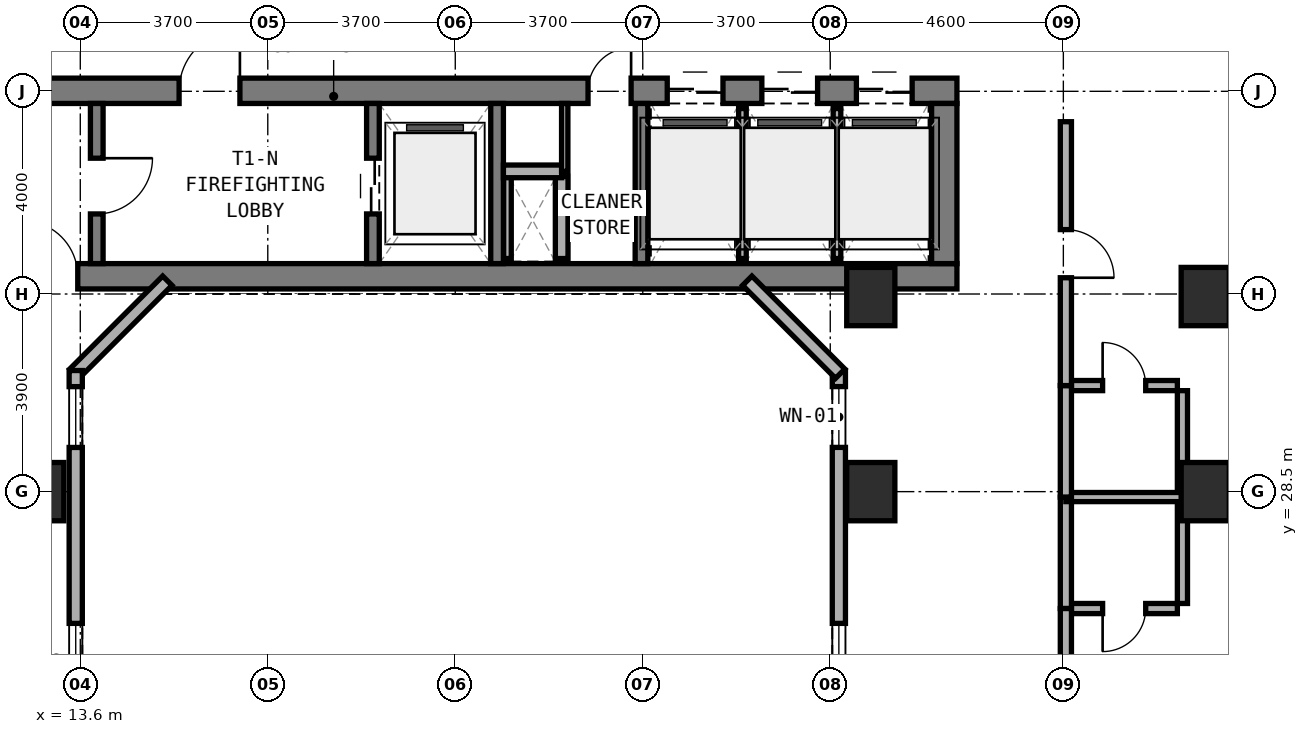
"""IFC4 building model, lengths in metres.
Left out: names, types, materials, properties, quantities, classifications, styles, units other than length and angle.
Written with IfcOpenShell. Run it as: python <this file> out.ifc"""

import sys

from ifc_helpers import new_model, si_unit, direction, frame, frame_2d, origin, origin_2d, place, context, subcontext, project, spatial, rectangle, extrude, element, fill, save


model = new_model("IFC4")
c1 = context("Model", 3, precision=1e-05, world=origin(), true_north=direction((0.0, 1.0)))
c2 = subcontext(c1, "Body", "Model", "MODEL_VIEW")
j1 = project(units=[si_unit("LENGTHUNIT", "METRE"), si_unit("PLANEANGLEUNIT", "RADIAN")], contexts=[c1])
p1 = place(None, origin())
s1 = spatial("IfcSite", under=j1, at=p1, CompositionType="ELEMENT")
p2 = place(p1, origin())
s2 = spatial("IfcBuilding", under=s1, at=p2, CompositionType="ELEMENT")
p3 = place(p2, frame((0.0, 0.0, 69.5)))
s3 = spatial("IfcBuildingStorey", under=s2, at=p3, CompositionType="ELEMENT", Elevation=69.5)
p4 = place(p3, frame((6.3, 32.75, 0.0), z_axis=(0.0, 0.0, 1.0), x_axis=(1.0, 0.0, 0.0)))
e1 = element("IfcWall", 1, at=p4, inside=s3, PredefinedType="SHEAR", context=c2, shape_type="SweptSolid", body=[
    extrude(rectangle(XDim=24.6, YDim=0.5, at=frame_2d((12.3, 0.0))), origin(), (0.0, 0.0, 1.0), 3.5),
])
p5 = place(p4, frame((6.15, 0.0, 0.0)))
e2 = element("IfcOpeningElement", 2, at=p5, cuts=e1, PredefinedType="OPENING", context=c2, shape_type="SweptSolid", body=[
    extrude(rectangle(XDim=1.1, YDim=2.15, at=frame_2d((0.55, 1.075))), frame((0.0, 0.26, 0.0), z_axis=(0.0, -1.0, 0.0), x_axis=(1.0, 0.0, 0.0)), (0.0, 0.0, 1.0), 0.52),
])
p6 = place(p3, frame((6.3, 36.41, 0.0), z_axis=(0.0, 0.0, 1.0), x_axis=(1.0, 0.0, 0.0)))
e3 = element("IfcWall", 3, at=p6, inside=s3, PredefinedType="SHEAR", context=c2, shape_type="SweptSolid", body=[
    extrude(rectangle(XDim=24.6, YDim=0.5, at=frame_2d((12.3, 0.0))), origin(), (0.0, 0.0, 1.0), 3.5),
])
p7 = place(p6, frame((9.25, 0.0, 0.0)))
e4 = element("IfcOpeningElement", 4, at=p7, cuts=e3, PredefinedType="OPENING", context=c2, shape_type="SweptSolid", body=[
    extrude(rectangle(XDim=1.2, YDim=2.15, at=frame_2d((0.6, 1.075))), frame((0.0, 0.26, 0.0), z_axis=(0.0, -1.0, 0.0), x_axis=(1.0, 0.0, 0.0)), (0.0, 0.0, 1.0), 0.52),
])
p8 = place(p6, frame((17.32, 0.0, 0.0)))
e5 = element("IfcOpeningElement", 5, at=p8, cuts=e3, PredefinedType="OPENING", context=c2, shape_type="SweptSolid", body=[
    extrude(rectangle(XDim=0.85, YDim=2.1, at=frame_2d((0.425, 1.05))), frame((0.0, 0.26, 0.0), z_axis=(0.0, -1.0, 0.0), x_axis=(1.0, 0.0, 0.0)), (0.0, 0.0, 1.0), 0.52),
])
p9 = place(p6, frame((18.883, 0.0, 0.0)))
e6 = element("IfcOpeningElement", 6, at=p9, cuts=e3, PredefinedType="OPENING", context=c2, shape_type="SweptSolid", body=[
    extrude(rectangle(XDim=1.1, YDim=2.15, at=frame_2d((0.55, 1.075))), frame((0.0, 0.26, 0.0), z_axis=(0.0, -1.0, 0.0), x_axis=(1.0, 0.0, 0.0)), (0.0, 0.0, 1.0), 0.52),
])
p10 = place(p6, frame((20.75, 0.0, 0.0)))
e7 = element("IfcOpeningElement", 7, at=p10, cuts=e3, PredefinedType="OPENING", context=c2, shape_type="SweptSolid", body=[
    extrude(rectangle(XDim=1.1, YDim=2.15, at=frame_2d((0.55, 1.075))), frame((0.0, 0.26, 0.0), z_axis=(0.0, -1.0, 0.0), x_axis=(1.0, 0.0, 0.0)), (0.0, 0.0, 1.0), 0.52),
])
p11 = place(p6, frame((22.616, 0.0, 0.0)))
e8 = element("IfcOpeningElement", 8, at=p11, cuts=e3, PredefinedType="OPENING", context=c2, shape_type="SweptSolid", body=[
    extrude(rectangle(XDim=1.1, YDim=2.15, at=frame_2d((0.55, 1.075))), frame((0.0, 0.26, 0.0), z_axis=(0.0, -1.0, 0.0), x_axis=(1.0, 0.0, 0.0)), (0.0, 0.0, 1.0), 0.52),
])
p12 = place(p3, frame((30.65, 33.0, 0.0), z_axis=(0.0, 0.0, 1.0), x_axis=(0.0, 1.0, 0.0)))
e9 = element("IfcWall", 9, at=p12, inside=s3, PredefinedType="SHEAR", context=c2, shape_type="SweptSolid", body=[
    extrude(rectangle(XDim=3.16, YDim=0.5, at=frame_2d((1.58, 0.0))), origin(), (0.0, 0.0, 1.0), 3.5),
])
p13 = place(p3, frame((13.925, 33.0, 0.0), z_axis=(0.0, 0.0, 1.0), x_axis=(0.0, 1.0, 0.0)))
e10 = element("IfcWall", 10, at=p13, inside=s3, PredefinedType="STANDARD", context=c2, shape_type="SweptSolid", body=[
    extrude(rectangle(XDim=3.16, YDim=0.25, at=frame_2d((1.58, 0.0))), origin(), (0.0, 0.0, 1.0), 3.22),
])
p14 = place(p13, frame((0.98, 0.0, 0.0)))
e11 = element("IfcOpeningElement", 11, at=p14, cuts=e10, PredefinedType="OPENING", context=c2, shape_type="SweptSolid", body=[
    extrude(rectangle(XDim=1.1, YDim=2.15, at=frame_2d((0.55, 1.075))), frame((0.0, 0.135, 0.0), z_axis=(0.0, -1.0, 0.0), x_axis=(1.0, 0.0, 0.0)), (0.0, 0.0, 1.0), 0.27),
])
p15 = place(p3, frame((19.375, 33.0, 0.0), z_axis=(0.0, 0.0, 1.0), x_axis=(0.0, 1.0, 0.0)))
e12 = element("IfcWall", 12, at=p15, inside=s3, PredefinedType="STANDARD", context=c2, shape_type="SweptSolid", body=[
    extrude(rectangle(XDim=3.16, YDim=0.25, at=frame_2d((1.58, 0.0))), origin(), (0.0, 0.0, 1.0), 3.22),
])
p16 = place(p15, frame((0.98, 0.0, 0.0)))
e13 = element("IfcOpeningElement", 13, at=p16, cuts=e12, PredefinedType="OPENING", context=c2, shape_type="SweptSolid", body=[
    extrude(rectangle(XDim=1.1, YDim=2.15, at=frame_2d((0.55, 1.075))), frame((0.0, 0.135, 0.0), z_axis=(0.0, -1.0, 0.0), x_axis=(1.0, 0.0, 0.0)), (0.0, 0.0, 1.0), 0.27),
])
for number, where, z_axis, x_axis in (
    (14, (21.825, 33.0, 0.0), (0.0, 0.0, 1.0), (0.0, 1.0, 0.0)),
    (15, (24.675, 33.0, 0.0), (0.0, 0.0, 1.0), (0.0, 1.0, 0.0)),
):
    element("IfcWall", number, at=place(p3, frame(where, z_axis=z_axis, x_axis=x_axis)), inside=s3, PredefinedType="STANDARD", context=c2, shape_type="SweptSolid", body=[
        extrude(rectangle(XDim=3.16, YDim=0.25, at=frame_2d((1.58, 0.0))), origin(), (0.0, 0.0, 1.0), 3.22),
    ])
for number, where, z_axis, x_axis in (
    (16, (35.8, 28.5, 0.0), (0.0, 0.0, 1.0), (1.0, 0.0, 0.0)),
    (17, (35.8, 32.35, 0.0), (0.0, 0.0, 1.0), (1.0, 0.0, 0.0)),
    (18, (12.8, 28.5, 0.0), (0.0, 0.0, 1.0), (1.0, 0.0, 0.0)),
    (19, (29.2, 32.35, 0.0), (0.0, 0.0, 1.0), (1.0, 0.0, 0.0)),
    (20, (29.2, 28.5, 0.0), (0.0, 0.0, 1.0), (1.0, 0.0, 0.0)),
):
    element("IfcColumn", number, at=place(p3, frame(where, z_axis=z_axis, x_axis=x_axis)), inside=s3, PredefinedType="COLUMN", context=c2, shape_type="SweptSolid", body=[
        extrude(rectangle(XDim=0.95, YDim=1.15, at=origin_2d()), origin(), (0.0, 0.0, 1.0), 3.5),
    ])
p17 = place(p3, frame((28.57, 19.11, 0.0), z_axis=(0.0, 0.0, 1.0), x_axis=(0.0, 1.0, 0.0)))
e21 = element("IfcWall", 21, at=p17, inside=s3, PredefinedType="STANDARD", context=c2, shape_type="SweptSolid", body=[
    extrude(rectangle(XDim=11.78, YDim=0.26, at=frame_2d((5.89, 0.0))), origin(), (0.0, 0.0, 1.0), 3.22),
])
p18 = place(p17, frame((0.318, 0.0, 0.85)))
e22 = element("IfcOpeningElement", 22, at=p18, cuts=e21, PredefinedType="OPENING", context=c2, shape_type="SweptSolid", body=[
    extrude(rectangle(XDim=1.2, YDim=1.5, at=frame_2d((0.6, 0.75))), frame((0.0, 0.14, 0.0), z_axis=(0.0, -1.0, 0.0), x_axis=(1.0, 0.0, 0.0)), (0.0, 0.0, 1.0), 0.28),
])
p19 = place(p17, frame((4.99, 0.0, 0.85)))
e23 = element("IfcOpeningElement", 23, at=p19, cuts=e21, PredefinedType="OPENING", context=c2, shape_type="SweptSolid", body=[
    extrude(rectangle(XDim=1.8, YDim=1.5, at=frame_2d((0.9, 0.75))), frame((0.0, 0.14, 0.0), z_axis=(0.0, -1.0, 0.0), x_axis=(1.0, 0.0, 0.0)), (0.0, 0.0, 1.0), 0.28),
])
p20 = place(p17, frame((10.263, 0.0, 0.85)))
e24 = element("IfcOpeningElement", 24, at=p20, cuts=e21, PredefinedType="OPENING", context=c2, shape_type="SweptSolid", body=[
    extrude(rectangle(XDim=1.2, YDim=1.5, at=frame_2d((0.6, 0.75))), frame((0.0, 0.14, 0.0), z_axis=(0.0, -1.0, 0.0), x_axis=(1.0, 0.0, 0.0)), (0.0, 0.0, 1.0), 0.28),
])
p21 = place(p3, frame((28.596, 30.828, 0.0), z_axis=(0.0, 0.0, 1.0), x_axis=(-0.707059717605, 0.707153841636, 0.0)))
e25 = element("IfcWall", 25, at=p21, inside=s3, PredefinedType="STANDARD", context=c2, shape_type="SweptSolid", body=[
    extrude(rectangle(XDim=2.594, YDim=0.26, at=frame_2d((1.297, 0.0))), origin(), (0.0, 0.0, 1.0), 3.22),
])
p22 = place(p3, frame((15.318, 32.662, 0.0), z_axis=(0.0, 0.0, 1.0), x_axis=(-0.707106781187, -0.707106781187, 0.0)))
e26 = element("IfcWall", 26, at=p22, inside=s3, PredefinedType="STANDARD", context=c2, shape_type="SweptSolid", body=[
    extrude(rectangle(XDim=2.594, YDim=0.26, at=frame_2d((1.297, 0.0))), origin(), (0.0, 0.0, 1.0), 3.22),
])
p23 = place(p3, frame((13.51, 30.89, 0.0), z_axis=(0.0, 0.0, 1.0), x_axis=(0.0, -1.0, 0.0)))
e27 = element("IfcWall", 27, at=p23, inside=s3, PredefinedType="STANDARD", context=c2, shape_type="SweptSolid", body=[
    extrude(rectangle(XDim=11.78, YDim=0.26, at=frame_2d((5.89, 0.0))), origin(), (0.0, 0.0, 1.0), 3.22),
])
p24 = place(p23, frame((0.318, 0.0, 0.85)))
e28 = element("IfcOpeningElement", 28, at=p24, cuts=e27, PredefinedType="OPENING", context=c2, shape_type="SweptSolid", body=[
    extrude(rectangle(XDim=1.2, YDim=1.5, at=frame_2d((0.6, 0.75))), frame((0.0, 0.14, 0.0), z_axis=(0.0, -1.0, 0.0), x_axis=(1.0, 0.0, 0.0)), (0.0, 0.0, 1.0), 0.28),
])
p25 = place(p23, frame((4.99, 0.0, 0.85)))
e29 = element("IfcOpeningElement", 29, at=p25, cuts=e27, PredefinedType="OPENING", context=c2, shape_type="SweptSolid", body=[
    extrude(rectangle(XDim=1.8, YDim=1.5, at=frame_2d((0.9, 0.75))), frame((0.0, 0.14, 0.0), z_axis=(0.0, -1.0, 0.0), x_axis=(1.0, 0.0, 0.0)), (0.0, 0.0, 1.0), 0.28),
])
p26 = place(p23, frame((10.263, 0.0, 0.85)))
e30 = element("IfcOpeningElement", 30, at=p26, cuts=e27, PredefinedType="OPENING", context=c2, shape_type="SweptSolid", body=[
    extrude(rectangle(XDim=1.2, YDim=1.5, at=frame_2d((0.6, 0.75))), frame((0.0, 0.14, 0.0), z_axis=(0.0, -1.0, 0.0), x_axis=(1.0, 0.0, 0.0)), (0.0, 0.0, 1.0), 0.28),
])
p27 = place(p3, frame((22.03, 33.1, 0.0), z_axis=(0.0, 0.0, 1.0), x_axis=(0.0, 1.0, 0.0)))
e31 = element("IfcWall", 31, at=p27, inside=s3, PredefinedType="PARTITIONING", context=c2, shape_type="SweptSolid", body=[
    extrude(rectangle(XDim=1.62, YDim=0.15, at=frame_2d((0.81, 0.0))), origin(), (0.0, 0.0, 1.0), 3.22),
])
p28 = place(p3, frame((23.1, 33.1, 0.0), z_axis=(0.0, 0.0, 1.0), x_axis=(0.0, 1.0, 0.0)))
e32 = element("IfcWall", 32, at=p28, inside=s3, PredefinedType="SOLIDWALL", context=c2, shape_type="SweptSolid", body=[
    extrude(rectangle(XDim=1.62, YDim=0.25, at=frame_2d((0.81, 0.0))), origin(), (0.0, 0.0, 1.0), 3.22),
])
p29 = place(p3, frame((21.95, 34.82, 0.0), z_axis=(0.0, 0.0, 1.0), x_axis=(1.0, 0.0, 0.0)))
e33 = element("IfcWall", 33, at=p29, inside=s3, PredefinedType="SOLIDWALL", context=c2, shape_type="SweptSolid", body=[
    extrude(rectangle(XDim=1.15, YDim=0.25, at=frame_2d((0.575, 0.0))), origin(), (0.0, 0.0, 1.0), 3.22),
])
p30 = place(p3, frame((23.16, 34.82, 0.0), z_axis=(0.0, 0.0, 1.0), x_axis=(0.0, 1.0, 0.0)))
e34 = element("IfcWall", 34, at=p30, inside=s3, PredefinedType="PARTITIONING", context=c2, shape_type="SweptSolid", body=[
    extrude(rectangle(XDim=1.34, YDim=0.125, at=frame_2d((0.67, 0.0))), origin(), (0.0, 0.0, 1.0), 3.22),
])
p31 = place(p3, frame((26.667, 33.1, 0.0), z_axis=(0.0, 0.0, 1.0), x_axis=(0.0, 1.0, 0.0)))
e35 = element("IfcWall", 35, at=p31, inside=s3, PredefinedType="PARTITIONING", context=c2, shape_type="SweptSolid", body=[
    extrude(rectangle(XDim=2.96, YDim=0.15, at=frame_2d((1.48, 0.0))), origin(), (0.0, 0.0, 1.0), 3.22),
])
p32 = place(p3, frame((28.533, 33.1, 0.0), z_axis=(0.0, 0.0, 1.0), x_axis=(0.0, 1.0, 0.0)))
e36 = element("IfcWall", 36, at=p32, inside=s3, PredefinedType="PARTITIONING", context=c2, shape_type="SweptSolid", body=[
    extrude(rectangle(XDim=2.96, YDim=0.15, at=frame_2d((1.48, 0.0))), origin(), (0.0, 0.0, 1.0), 2.495),
])
p33 = place(p3, frame((33.15, 26.193, 0.0), z_axis=(0.0, 0.0, 1.0), x_axis=(1.0, 0.0, 0.0)))
e37 = element("IfcWall", 37, at=p33, inside=s3, PredefinedType="PLUMBINGWALL", context=c2, shape_type="SweptSolid", body=[
    extrude(rectangle(XDim=2.1, YDim=0.2, at=frame_2d((1.05, 0.0))), origin(), (0.0, 0.0, 1.0), 3.22),
])
p34 = place(p33, frame((0.625, 0.0, 0.0)))
e38 = element("IfcOpeningElement", 38, at=p34, cuts=e37, PredefinedType="OPENING", context=c2, shape_type="SweptSolid", body=[
    extrude(rectangle(XDim=0.85, YDim=2.1, at=frame_2d((0.425, 1.05))), frame((0.0, 0.11, 0.0), z_axis=(0.0, -1.0, 0.0), x_axis=(1.0, 0.0, 0.0)), (0.0, 0.0, 1.0), 0.22),
])
p35 = place(p3, frame((35.35, 26.293, 0.0), z_axis=(0.0, 0.0, 1.0), x_axis=(0.0, 1.0, 0.0)))
e39 = element("IfcWall", 39, at=p35, inside=s3, PredefinedType="PLUMBINGWALL", context=c2, shape_type="SweptSolid", body=[
    extrude(rectangle(XDim=2.0, YDim=0.2, at=frame_2d((1.0, 0.0))), origin(), (0.0, 0.0, 1.0), 3.22),
])
p36 = place(p3, frame((33.05, 26.193, 0.0), z_axis=(0.0, 0.0, 1.0), x_axis=(0.0, 1.0, 0.0)))
e40 = element("IfcWall", 40, at=p36, inside=s3, PredefinedType="SOLIDWALL", context=c2, shape_type="SweptSolid", body=[
    extrude(rectangle(XDim=2.2, YDim=0.22, at=frame_2d((1.1, 0.0))), origin(), (0.0, 0.0, 1.0), 3.22),
])
p37 = place(p3, frame((33.05, 21.049, 0.0), z_axis=(0.0, 0.0, 1.0), x_axis=(0.0, 1.0, 0.0)))
e41 = element("IfcWall", 41, at=p37, inside=s3, PredefinedType="SOLIDWALL", context=c2, shape_type="SweptSolid", body=[
    extrude(rectangle(XDim=5.144, YDim=0.22, at=frame_2d((2.572, 0.0))), origin(), (0.0, 0.0, 1.0), 2.495),
])
p38 = place(p37, frame((2.097, 0.0, 0.0)))
e42 = element("IfcOpeningElement", 42, at=p38, cuts=e41, PredefinedType="OPENING", context=c2, shape_type="SweptSolid", body=[
    extrude(rectangle(XDim=0.95, YDim=2.1, at=frame_2d((0.475, 1.05))), frame((0.0, 0.12, 0.0), z_axis=(0.0, -1.0, 0.0), x_axis=(1.0, 0.0, 0.0)), (0.0, 0.0, 1.0), 0.24),
])
p39 = place(p3, frame((33.05, 28.393, 0.0), z_axis=(0.0, 0.0, 1.0), x_axis=(1.0, 0.0, 0.0)))
e43 = element("IfcWall", 43, at=p39, inside=s3, PredefinedType="SOLIDWALL", context=c2, shape_type="SweptSolid", body=[
    extrude(rectangle(XDim=8.89, YDim=0.18, at=frame_2d((4.445, 0.0))), origin(), (0.0, 0.0, 1.0), 2.495),
])
p40 = place(p3, frame((33.15, 30.593, 0.0), z_axis=(0.0, 0.0, 1.0), x_axis=(1.0, 0.0, 0.0)))
e44 = element("IfcWall", 44, at=p40, inside=s3, PredefinedType="PLUMBINGWALL", context=c2, shape_type="SweptSolid", body=[
    extrude(rectangle(XDim=2.1, YDim=0.2, at=frame_2d((1.05, 0.0))), origin(), (0.0, 0.0, 1.0), 3.22),
])
p41 = place(p40, frame((0.625, 0.0, 0.0)))
e45 = element("IfcOpeningElement", 45, at=p41, cuts=e44, PredefinedType="OPENING", context=c2, shape_type="SweptSolid", body=[
    extrude(rectangle(XDim=0.85, YDim=2.1, at=frame_2d((0.425, 1.05))), frame((0.0, 0.11, 0.0), z_axis=(0.0, -1.0, 0.0), x_axis=(1.0, 0.0, 0.0)), (0.0, 0.0, 1.0), 0.22),
])
p42 = place(p3, frame((35.35, 28.493, 0.0), z_axis=(0.0, 0.0, 1.0), x_axis=(0.0, 1.0, 0.0)))
e46 = element("IfcWall", 46, at=p42, inside=s3, PredefinedType="PLUMBINGWALL", context=c2, shape_type="SweptSolid", body=[
    extrude(rectangle(XDim=2.0, YDim=0.2, at=frame_2d((1.0, 0.0))), origin(), (0.0, 0.0, 1.0), 2.495),
])
p43 = place(p3, frame((33.05, 28.393, 0.0), z_axis=(0.0, 0.0, 1.0), x_axis=(0.0, 1.0, 0.0)))
e47 = element("IfcWall", 47, at=p43, inside=s3, PredefinedType="SOLIDWALL", context=c2, shape_type="SweptSolid", body=[
    extrude(rectangle(XDim=2.2, YDim=0.22, at=frame_2d((1.1, 0.0))), origin(), (0.0, 0.0, 1.0), 2.495),
])
p44 = place(p3, frame((33.05, 30.593, 0.0), z_axis=(0.0, 0.0, 1.0), x_axis=(0.0, 1.0, 0.0)))
e48 = element("IfcWall", 48, at=p44, inside=s3, PredefinedType="SOLIDWALL", context=c2, shape_type="SweptSolid", body=[
    extrude(rectangle(XDim=5.207, YDim=0.22, at=frame_2d((2.604, 0.0))), origin(), (0.0, 0.0, 1.0), 2.495),
])
p45 = place(p44, frame((2.128, 0.0, 0.0)))
e49 = element("IfcOpeningElement", 49, at=p45, cuts=e48, PredefinedType="OPENING", context=c2, shape_type="SweptSolid", body=[
    extrude(rectangle(XDim=0.95, YDim=2.1, at=frame_2d((0.475, 1.05))), frame((0.0, 0.12, 0.0), z_axis=(0.0, -1.0, 0.0), x_axis=(1.0, 0.0, 0.0)), (0.0, 0.0, 1.0), 0.24),
])
p46 = place(p19, origin())
e50 = element("IfcWindow", 50, at=p46, inside=s3, PartitioningType="SINGLE_PANEL", PredefinedType="WINDOW", context=c2, shape_type="SweptSolid", body=[
    extrude(rectangle(XDim=1.8, YDim=1.5, at=frame_2d((0.9, 0.75))), frame((0.0, 0.03, 0.0), z_axis=(0.0, -1.0, 0.0), x_axis=(1.0, 0.0, 0.0)), (0.0, 0.0, 1.0), 0.06),
])
fill(e23, e50)
p47 = place(p20, origin())
e51 = element("IfcWindow", 51, at=p47, inside=s3, PartitioningType="SINGLE_PANEL", PredefinedType="WINDOW", context=c2, shape_type="SweptSolid", body=[
    extrude(rectangle(XDim=1.2, YDim=1.5, at=frame_2d((0.6, 0.75))), frame((0.0, 0.03, 0.0), z_axis=(0.0, -1.0, 0.0), x_axis=(1.0, 0.0, 0.0)), (0.0, 0.0, 1.0), 0.06),
])
fill(e24, e51)
p48 = place(p24, origin())
e52 = element("IfcWindow", 52, at=p48, inside=s3, PartitioningType="SINGLE_PANEL", PredefinedType="WINDOW", context=c2, shape_type="SweptSolid", body=[
    extrude(rectangle(XDim=1.2, YDim=1.5, at=frame_2d((0.6, 0.75))), frame((0.0, 0.03, 0.0), z_axis=(0.0, -1.0, 0.0), x_axis=(1.0, 0.0, 0.0)), (0.0, 0.0, 1.0), 0.06),
])
fill(e28, e52)
p49 = place(p25, origin())
e53 = element("IfcWindow", 53, at=p49, inside=s3, PartitioningType="SINGLE_PANEL", PredefinedType="WINDOW", context=c2, shape_type="SweptSolid", body=[
    extrude(rectangle(XDim=1.8, YDim=1.5, at=frame_2d((0.9, 0.75))), frame((0.0, 0.03, 0.0), z_axis=(0.0, -1.0, 0.0), x_axis=(1.0, 0.0, 0.0)), (0.0, 0.0, 1.0), 0.06),
])
fill(e29, e53)
p50 = place(p14, frame((1.1, 0.0, 0.0), z_axis=(0.0, 0.0, 1.0), x_axis=(-1.0, 0.0, 0.0)))
e54 = element("IfcDoor", 54, at=p50, inside=s3, OperationType="SINGLE_SWING_LEFT", PredefinedType="DOOR", context=c2, shape_type="SweptSolid", body=[
    extrude(rectangle(XDim=1.1, YDim=2.15, at=frame_2d((0.55, 1.075))), frame((0.0, 0.025, 0.0), z_axis=(0.0, -1.0, 0.0), x_axis=(1.0, 0.0, 0.0)), (0.0, 0.0, 1.0), 0.05),
])
fill(e11, e54)
p51 = place(p7, origin())
e55 = element("IfcDoor", 55, at=p51, inside=s3, OperationType="SINGLE_SWING_RIGHT", PredefinedType="DOOR", context=c2, shape_type="SweptSolid", body=[
    extrude(rectangle(XDim=1.2, YDim=2.15, at=frame_2d((0.6, 1.075))), frame((0.0, 0.025, 0.0), z_axis=(0.0, -1.0, 0.0), x_axis=(1.0, 0.0, 0.0)), (0.0, 0.0, 1.0), 0.05),
])
fill(e4, e55)
p52 = place(p16, origin())
e56 = element("IfcDoor", 56, at=p52, inside=s3, OperationType="DOUBLE_DOOR_SLIDING", PredefinedType="DOOR", context=c2, shape_type="SweptSolid", body=[
    extrude(rectangle(XDim=1.1, YDim=2.15, at=frame_2d((0.55, 1.075))), frame((0.0, 0.025, 0.0), z_axis=(0.0, -1.0, 0.0), x_axis=(1.0, 0.0, 0.0)), (0.0, 0.0, 1.0), 0.05),
])
fill(e13, e56)
p53 = place(p8, origin())
e57 = element("IfcDoor", 57, at=p53, inside=s3, OperationType="SINGLE_SWING_RIGHT", PredefinedType="DOOR", context=c2, shape_type="SweptSolid", body=[
    extrude(rectangle(XDim=0.85, YDim=2.1, at=frame_2d((0.425, 1.05))), frame((0.0, 0.025, 0.0), z_axis=(0.0, -1.0, 0.0), x_axis=(1.0, 0.0, 0.0)), (0.0, 0.0, 1.0), 0.05),
])
fill(e5, e57)
p54 = place(p9, origin())
e58 = element("IfcDoor", 58, at=p54, inside=s3, OperationType="DOUBLE_DOOR_SLIDING", PredefinedType="DOOR", context=c2, shape_type="SweptSolid", body=[
    extrude(rectangle(XDim=1.1, YDim=2.15, at=frame_2d((0.55, 1.075))), frame((0.0, 0.025, 0.0), z_axis=(0.0, -1.0, 0.0), x_axis=(1.0, 0.0, 0.0)), (0.0, 0.0, 1.0), 0.05),
])
fill(e6, e58)
p55 = place(p10, origin())
e59 = element("IfcDoor", 59, at=p55, inside=s3, OperationType="DOUBLE_DOOR_SLIDING", PredefinedType="DOOR", context=c2, shape_type="SweptSolid", body=[
    extrude(rectangle(XDim=1.1, YDim=2.15, at=frame_2d((0.55, 1.075))), frame((0.0, 0.025, 0.0), z_axis=(0.0, -1.0, 0.0), x_axis=(1.0, 0.0, 0.0)), (0.0, 0.0, 1.0), 0.05),
])
fill(e7, e59)
p56 = place(p11, origin())
e60 = element("IfcDoor", 60, at=p56, inside=s3, OperationType="DOUBLE_DOOR_SLIDING", PredefinedType="DOOR", context=c2, shape_type="SweptSolid", body=[
    extrude(rectangle(XDim=1.1, YDim=2.15, at=frame_2d((0.55, 1.075))), frame((0.0, 0.025, 0.0), z_axis=(0.0, -1.0, 0.0), x_axis=(1.0, 0.0, 0.0)), (0.0, 0.0, 1.0), 0.05),
])
fill(e8, e60)
p57 = place(p5, origin())
e61 = element("IfcDoor", 61, at=p57, inside=s3, OperationType="SINGLE_SWING_LEFT", PredefinedType="DOOR", context=c2, shape_type="SweptSolid", body=[
    extrude(rectangle(XDim=1.1, YDim=2.15, at=frame_2d((0.55, 1.075))), frame((0.0, 0.025, 0.0), z_axis=(0.0, -1.0, 0.0), x_axis=(1.0, 0.0, 0.0)), (0.0, 0.0, 1.0), 0.05),
])
fill(e2, e61)
p58 = place(p34, frame((0.85, 0.0, 0.0), z_axis=(0.0, 0.0, 1.0), x_axis=(-1.0, 0.0, 0.0)))
e62 = element("IfcDoor", 62, at=p58, inside=s3, OperationType="SINGLE_SWING_RIGHT", PredefinedType="DOOR", context=c2, shape_type="SweptSolid", body=[
    extrude(rectangle(XDim=0.85, YDim=2.1, at=frame_2d((0.425, 1.05))), frame((0.0, 0.025, 0.0), z_axis=(0.0, -1.0, 0.0), x_axis=(1.0, 0.0, 0.0)), (0.0, 0.0, 1.0), 0.05),
])
fill(e38, e62)
p59 = place(p41, origin())
e63 = element("IfcDoor", 63, at=p59, inside=s3, OperationType="SINGLE_SWING_LEFT", PredefinedType="DOOR", context=c2, shape_type="SweptSolid", body=[
    extrude(rectangle(XDim=0.85, YDim=2.1, at=frame_2d((0.425, 1.05))), frame((0.0, 0.025, 0.0), z_axis=(0.0, -1.0, 0.0), x_axis=(1.0, 0.0, 0.0)), (0.0, 0.0, 1.0), 0.05),
])
fill(e45, e63)
p60 = place(p45, frame((0.95, 0.0, 0.0), z_axis=(0.0, 0.0, 1.0), x_axis=(-1.0, 0.0, 0.0)))
e64 = element("IfcDoor", 64, at=p60, inside=s3, OperationType="SINGLE_SWING_RIGHT", PredefinedType="DOOR", context=c2, shape_type="SweptSolid", body=[
    extrude(rectangle(XDim=0.95, YDim=2.1, at=frame_2d((0.475, 1.05))), frame((0.0, 0.025, 0.0), z_axis=(0.0, -1.0, 0.0), x_axis=(1.0, 0.0, 0.0)), (0.0, 0.0, 1.0), 0.05),
])
fill(e49, e64)
save(model, sys.argv[1])
